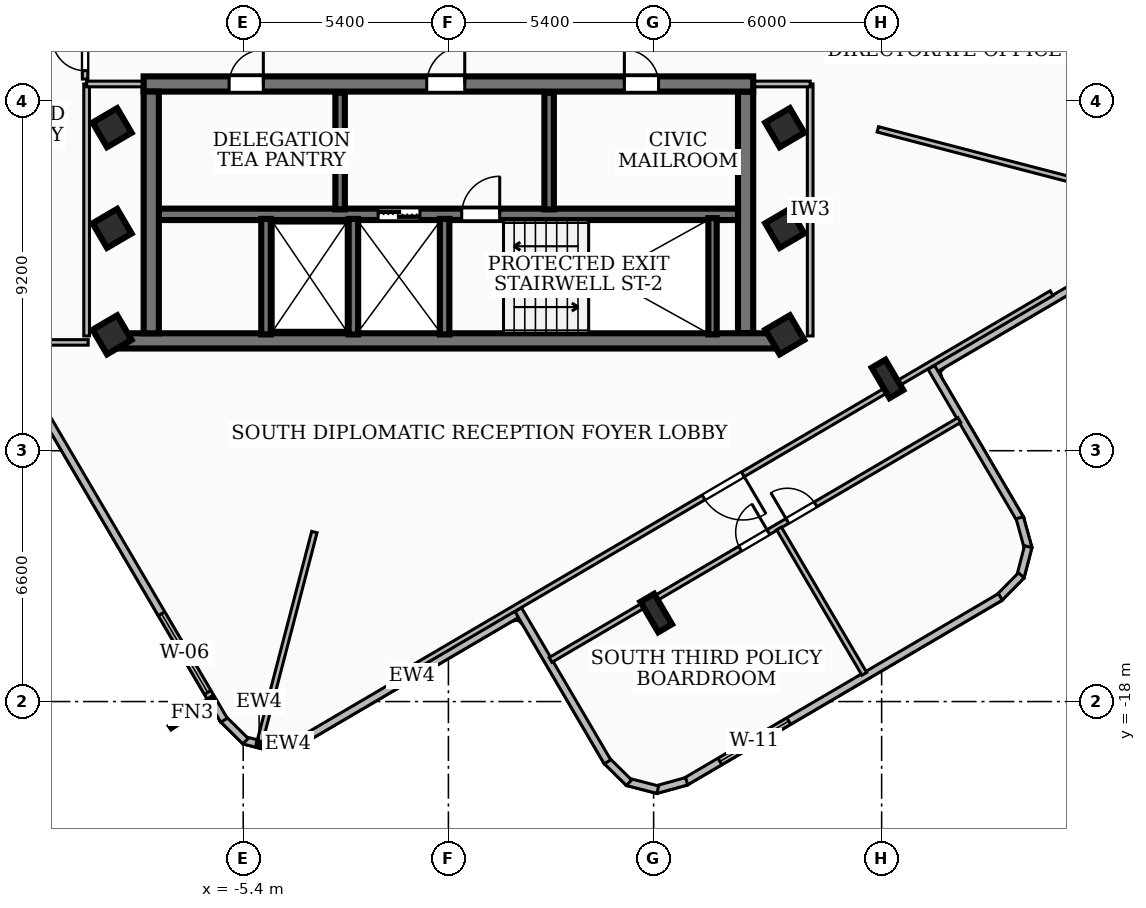
"""IFC4 building model, lengths in metres.
Left out: names, types, materials, properties, quantities, classifications, styles, units other than length and angle.
Written with IfcOpenShell. Run it as: python <this file> out.ifc"""

import sys

from ifc_helpers import new_model, si_unit, direction, frame, frame_2d, origin, origin_2d, place, context, subcontext, project, spatial, rectangle, i_section, extrude, element, fill, save


model = new_model("IFC4")
c1 = context("Model", 3, precision=1e-05, world=origin(), true_north=direction((0.0, 1.0)))
c2 = subcontext(c1, "Body", "Model", "MODEL_VIEW")
j1 = project(units=[si_unit("LENGTHUNIT", "METRE"), si_unit("PLANEANGLEUNIT", "RADIAN")], contexts=[c1])
p1 = place(None, origin())
s1 = spatial("IfcSite", under=j1, at=p1, CompositionType="ELEMENT")
p2 = place(p1, origin())
s2 = spatial("IfcBuilding", under=s1, at=p2, CompositionType="ELEMENT")
p3 = place(p2, frame((0.0, 0.0, 212.04)))
s3 = spatial("IfcBuildingStorey", under=s2, at=p3, CompositionType="ELEMENT", Elevation=212.04)
p4 = place(p3, frame((8.78, -8.51, 0.0), z_axis=(0.0, 0.0, 1.0), x_axis=(-1.0, 0.0, 0.0)))
e1 = element("IfcWall", 1, at=p4, inside=s3, PredefinedType="SHEAR", context=c2, shape_type="SweptSolid", body=[
    extrude(rectangle(XDim=17.56, YDim=0.4, at=frame_2d((8.78, 0.0))), origin(), (0.0, 0.0, 1.0), 3.16),
])
p5 = place(p3, frame((-8.02, -1.75, 0.0), z_axis=(0.0, 0.0, 1.0), x_axis=(1.0, 0.0, 0.0)))
e2 = element("IfcWall", 2, at=p5, inside=s3, PredefinedType="SHEAR", context=c2, shape_type="SweptSolid", body=[
    extrude(rectangle(XDim=16.04, YDim=0.4, at=frame_2d((8.02, 0.0))), origin(), (0.0, 0.0, 1.0), 3.16),
])
p6 = place(p5, frame((7.45, 0.0, 0.0)))
e3 = element("IfcOpeningElement", 3, at=p6, cuts=e2, PredefinedType="OPENING", context=c2, shape_type="SweptSolid", body=[
    extrude(rectangle(XDim=1.0, YDim=2.1, at=frame_2d((0.5, 1.05))), frame((0.0, 0.21, 0.0), z_axis=(0.0, -1.0, 0.0), x_axis=(1.0, 0.0, 0.0)), (0.0, 0.0, 1.0), 0.42),
])
p7 = place(p5, frame((12.65, 0.0, 0.0)))
e4 = element("IfcOpeningElement", 4, at=p7, cuts=e2, PredefinedType="OPENING", context=c2, shape_type="SweptSolid", body=[
    extrude(rectangle(XDim=0.9, YDim=2.06, at=frame_2d((0.45, 1.03))), frame((0.0, 0.21, 0.0), z_axis=(0.0, -1.0, 0.0), x_axis=(1.0, 0.0, 0.0)), (0.0, 0.0, 1.0), 0.42),
])
p8 = place(p5, frame((2.25, 0.0, 0.0)))
e5 = element("IfcOpeningElement", 5, at=p8, cuts=e2, PredefinedType="OPENING", context=c2, shape_type="SweptSolid", body=[
    extrude(rectangle(XDim=0.9, YDim=2.06, at=frame_2d((0.45, 1.03))), frame((0.0, 0.21, 0.0), z_axis=(0.0, -1.0, 0.0), x_axis=(1.0, 0.0, 0.0)), (0.0, 0.0, 1.0), 0.42),
])
for number, where, z_axis, x_axis in (
    (6, (-7.82, -8.31, 0.0), (0.0, 0.0, 1.0), (0.0, 1.0, 0.0)),
    (7, (7.82, -1.95, 0.0), (0.0, 0.0, 1.0), (0.0, -1.0, 0.0)),
):
    element("IfcWall", number, at=place(p3, frame(where, z_axis=z_axis, x_axis=x_axis)), inside=s3, PredefinedType="SHEAR", context=c2, shape_type="SweptSolid", body=[
        extrude(rectangle(XDim=6.36, YDim=0.4, at=frame_2d((3.18, 0.0))), origin(), (0.0, 0.0, 1.0), 3.16),
    ])
p9 = place(p3, frame((-7.62, -5.18, 0.0), z_axis=(0.0, 0.0, 1.0), x_axis=(1.0, 0.0, 0.0)))
e8 = element("IfcWall", 8, at=p9, inside=s3, PredefinedType="SOLIDWALL", context=c2, shape_type="SweptSolid", body=[
    extrude(rectangle(XDim=15.24, YDim=0.3, at=frame_2d((7.62, 0.0))), origin(), (0.0, 0.0, 1.0), 3.16),
])
p10 = place(p9, frame((5.77, 0.0, 0.0)))
e9 = element("IfcOpeningElement", 9, at=p10, cuts=e8, PredefinedType="OPENING", context=c2, shape_type="SweptSolid", body=[
    extrude(rectangle(XDim=1.1, YDim=2.15, at=frame_2d((0.55, 1.075))), frame((0.0, 0.16, 0.0), z_axis=(0.0, -1.0, 0.0), x_axis=(1.0, 0.0, 0.0)), (0.0, 0.0, 1.0), 0.32),
])
p11 = place(p9, frame((7.97, 0.0, 0.0)))
e10 = element("IfcOpeningElement", 10, at=p11, cuts=e8, PredefinedType="OPENING", context=c2, shape_type="SweptSolid", body=[
    extrude(rectangle(XDim=1.0, YDim=2.1, at=frame_2d((0.5, 1.05))), frame((0.0, 0.16, 0.0), z_axis=(0.0, -1.0, 0.0), x_axis=(1.0, 0.0, 0.0)), (0.0, 0.0, 1.0), 0.32),
])
p12 = place(p3, frame((6.95, -8.34, 0.0), z_axis=(0.0, 0.0, 1.0), x_axis=(0.0, 1.0, 0.0)))
e11 = element("IfcWall", 11, at=p12, inside=s3, PredefinedType="SOLIDWALL", context=c2, shape_type="SweptSolid", body=[
    extrude(rectangle(XDim=3.06, YDim=0.22, at=frame_2d((1.53, 0.0))), origin(), (0.0, 0.0, 1.0), 3.16),
])
for number, where, z_axis, x_axis in (
    (12, (-0.1, -8.34, 0.0), (0.0, 0.0, 1.0), (0.0, 1.0, 0.0)),
    (13, (-2.5, -8.34, 0.0), (0.0, 0.0, 1.0), (0.0, 1.0, 0.0)),
    (14, (-4.8, -8.34, 0.0), (0.0, 0.0, 1.0), (0.0, 1.0, 0.0)),
):
    element("IfcWall", number, at=place(p3, frame(where, z_axis=z_axis, x_axis=x_axis)), inside=s3, PredefinedType="SOLIDWALL", context=c2, shape_type="SweptSolid", body=[
        extrude(rectangle(XDim=3.04, YDim=0.25, at=frame_2d((1.52, 0.0))), origin(), (0.0, 0.0, 1.0), 3.16),
    ])
for number, where, z_axis, x_axis in (
    (15, (-2.85, -5.05, 0.0), (0.0, 0.0, 1.0), (0.0, 1.0, 0.0)),
    (16, (2.65, -5.05, 0.0), (0.0, 0.0, 1.0), (0.0, 1.0, 0.0)),
):
    element("IfcWall", number, at=place(p3, frame(where, z_axis=z_axis, x_axis=x_axis)), inside=s3, PredefinedType="SOLIDWALL", context=c2, shape_type="SweptSolid", body=[
        extrude(rectangle(XDim=3.07, YDim=0.25, at=frame_2d((1.535, 0.0))), origin(), (0.0, 0.0, 1.0), 3.16),
    ])
for number, where, z_axis, x_axis in (
    (17, (-8.85, -5.55, 0.0), (0.0, 0.0, 1.0), (0.863, 0.506, 0.0)),
    (18, (-8.85, -2.9, 0.0), (0.0, 0.0, 1.0), (0.863, 0.506, 0.0)),
    (19, (8.85, -5.55, 0.0), (0.0, 0.0, 1.0), (0.863, 0.506, 0.0)),
    (20, (8.85, -2.9, 0.0), (0.0, 0.0, 1.0), (0.863, 0.506, 0.0)),
    (21, (8.85, -8.35, 0.0), (0.0, 0.0, 1.0), (0.863, 0.506, 0.0)),
    (22, (-8.85, -8.35, 0.0), (0.0, 0.0, 1.0), (0.863, 0.506, 0.0)),
):
    element("IfcColumn", number, at=place(p3, frame(where, z_axis=z_axis, x_axis=x_axis)), inside=s3, PredefinedType="COLUMN", context=c2, shape_type="SweptSolid", body=[
        extrude(rectangle(XDim=0.75, YDim=0.75, at=origin_2d()), origin(), (0.0, 0.0, 1.0), 3.42),
    ])
for number, where, z_axis, x_axis in (
    (23, (5.468, -15.671, 0.0), (0.0, 0.0, 1.0), (0.863, 0.506, 0.0)),
    (24, (11.554, -9.51, 0.0), (0.0, 0.0, 1.0), (0.863, 0.506, 0.0)),
):
    element("IfcColumn", number, at=place(p3, frame(where, z_axis=z_axis, x_axis=x_axis)), inside=s3, PredefinedType="COLUMN", context=c2, shape_type="SweptSolid", body=[
        extrude(i_section(OverallWidth=0.418, OverallDepth=0.927, WebThickness=0.019, FlangeThickness=0.032, at=origin_2d()), origin(), (0.0, 0.0, 1.0), 3.42),
    ])
p13 = place(p3, frame((1.948, -15.612, 0.0), z_axis=(0.0, 0.0, 1.0), x_axis=(-0.86259717351, -0.505891407569, 0.0)))
e25 = element("IfcWall", 25, at=p13, inside=s3, PredefinedType="SOLIDWALL", context=c2, shape_type="SweptSolid", body=[
    extrude(rectangle(XDim=6.742, YDim=0.2, at=frame_2d((3.371, 0.0))), origin(), (0.0, 0.0, 1.0), 3.16),
])
p14 = place(p3, frame((-3.822, -19.003, 0.0), z_axis=(0.0, 0.0, 1.0), x_axis=(-0.963905015631, -0.266246353668, 0.0)))
e26 = element("IfcWall", 26, at=p14, inside=s3, PredefinedType="SOLIDWALL", context=c2, shape_type="SweptSolid", body=[
    extrude(rectangle(XDim=0.838, YDim=0.2, at=frame_2d((0.419, 0.0))), origin(), (0.0, 0.0, 1.0), 3.16),
])
p15 = place(p3, frame((-4.582, -19.225, 0.0), z_axis=(0.0, 0.0, 1.0), x_axis=(-0.967943577658, 0.251167733737, 0.0)))
e27 = element("IfcWall", 27, at=p15, inside=s3, PredefinedType="SOLIDWALL", context=c2, shape_type="SweptSolid", body=[
    extrude(rectangle(XDim=0.824, YDim=0.2, at=frame_2d((0.412, 0.0))), origin(), (0.0, 0.0, 1.0), 3.16),
])
p16 = place(p3, frame((-5.338, -19.042, 0.0), z_axis=(0.0, 0.0, 1.0), x_axis=(-0.711310891957, 0.702877524881, 0.0)))
e28 = element("IfcWall", 28, at=p16, inside=s3, PredefinedType="SOLIDWALL", context=c2, shape_type="SweptSolid", body=[
    extrude(rectangle(XDim=0.84, YDim=0.2, at=frame_2d((0.42, 0.0))), origin(), (0.0, 0.0, 1.0), 3.16),
])
p17 = place(p3, frame((-5.904, -18.492, 0.0), z_axis=(0.0, 0.0, 1.0), x_axis=(-0.506046465446, 0.862506217258, 0.0)))
e29 = element("IfcWall", 29, at=p17, inside=s3, PredefinedType="SOLIDWALL", context=c2, shape_type="SweptSolid", body=[
    extrude(rectangle(XDim=25.924, YDim=0.2, at=frame_2d((12.962, 0.0))), origin(), (0.0, 0.0, 1.0), 3.16),
])
p18 = place(p17, frame((0.85, 0.0, 0.85)))
e30 = element("IfcOpeningElement", 30, at=p18, cuts=e29, PredefinedType="OPENING", context=c2, shape_type="SweptSolid", body=[
    extrude(rectangle(XDim=2.4, YDim=1.85, at=frame_2d((1.2, 0.925))), frame((0.0, 0.11, 0.0), z_axis=(0.0, -1.0, 0.0), x_axis=(1.0, 0.0, 0.0)), (0.0, 0.0, 1.0), 0.22),
])
p19 = place(p3, frame((15.611, 1.948, 0.0), z_axis=(0.0, 0.0, 1.0), x_axis=(0.505999167705, -0.862533965872, 0.0)))
e31 = element("IfcWall", 31, at=p19, inside=s3, PredefinedType="SOLIDWALL", context=c2, shape_type="SweptSolid", body=[
    extrude(rectangle(XDim=6.743, YDim=0.2, at=frame_2d((3.372, 0.0))), origin(), (0.0, 0.0, 1.0), 3.16),
])
p20 = place(p3, frame((18.492, -5.904, 0.0), z_axis=(0.0, 0.0, 1.0), x_axis=(-0.86245977502, -0.506125613333, 0.0)))
e32 = element("IfcWall", 32, at=p20, inside=s3, PredefinedType="SOLIDWALL", context=c2, shape_type="SweptSolid", body=[
    extrude(rectangle(XDim=6.741, YDim=0.2, at=frame_2d((3.371, 0.0))), origin(), (0.0, 0.0, 1.0), 3.16),
])
p21 = place(p3, frame((12.707, -9.207, 0.0), z_axis=(0.0, 0.0, 1.0), x_axis=(0.505936854923, -0.862570518178, 0.0)))
e33 = element("IfcWall", 33, at=p21, inside=s3, PredefinedType="SOLIDWALL", context=c2, shape_type="SweptSolid", body=[
    extrude(rectangle(XDim=4.641, YDim=0.2, at=frame_2d((2.32, 0.0))), origin(), (0.0, 0.0, 1.0), 3.16),
])
p22 = place(p3, frame((15.035, -13.164, 0.0), z_axis=(0.0, 0.0, 1.0), x_axis=(0.266246353668, -0.963905015631, 0.0)))
e34 = element("IfcWall", 34, at=p22, inside=s3, PredefinedType="SOLIDWALL", context=c2, shape_type="SweptSolid", body=[
    extrude(rectangle(XDim=0.838, YDim=0.2, at=frame_2d((0.419, 0.0))), origin(), (0.0, 0.0, 1.0), 3.16),
])
p23 = place(p3, frame((15.257, -13.924, 0.0), z_axis=(0.0, 0.0, 1.0), x_axis=(-0.251167733737, -0.967943577658, 0.0)))
e35 = element("IfcWall", 35, at=p23, inside=s3, PredefinedType="SOLIDWALL", context=c2, shape_type="SweptSolid", body=[
    extrude(rectangle(XDim=0.824, YDim=0.2, at=frame_2d((0.412, 0.0))), origin(), (0.0, 0.0, 1.0), 3.16),
])
p24 = place(p3, frame((15.074, -14.68, 0.0), z_axis=(0.0, 0.0, 1.0), x_axis=(-0.702877524881, -0.711310891957, 0.0)))
e36 = element("IfcWall", 36, at=p24, inside=s3, PredefinedType="SOLIDWALL", context=c2, shape_type="SweptSolid", body=[
    extrude(rectangle(XDim=0.84, YDim=0.2, at=frame_2d((0.42, 0.0))), origin(), (0.0, 0.0, 1.0), 3.16),
])
p25 = place(p3, frame((14.524, -15.246, 0.0), z_axis=(0.0, 0.0, 1.0), x_axis=(-0.862483422861, -0.506085314241, 0.0)))
e37 = element("IfcWall", 37, at=p25, inside=s3, PredefinedType="SOLIDWALL", context=c2, shape_type="SweptSolid", body=[
    extrude(rectangle(XDim=9.625, YDim=0.2, at=frame_2d((4.812, 0.0))), origin(), (0.0, 0.0, 1.0), 3.16),
])
p26 = place(p25, frame((6.457, 0.0, 0.85)))
e38 = element("IfcOpeningElement", 38, at=p26, cuts=e37, PredefinedType="OPENING", context=c2, shape_type="SweptSolid", body=[
    extrude(rectangle(XDim=2.1, YDim=1.6, at=frame_2d((1.05, 0.8))), frame((0.0, 0.11, 0.0), z_axis=(0.0, -1.0, 0.0), x_axis=(1.0, 0.0, 0.0)), (0.0, 0.0, 1.0), 0.22),
])
p27 = place(p3, frame((6.269, -20.097, 0.0), z_axis=(0.0, 0.0, 1.0), x_axis=(-0.963925656212, -0.266171616247, 0.0)))
e39 = element("IfcWall", 39, at=p27, inside=s3, PredefinedType="SOLIDWALL", context=c2, shape_type="SweptSolid", body=[
    extrude(rectangle(XDim=0.838, YDim=0.2, at=frame_2d((0.419, 0.0))), origin(), (0.0, 0.0, 1.0), 3.16),
])
p28 = place(p3, frame((5.509, -20.319, 0.0), z_axis=(0.0, 0.0, 1.0), x_axis=(-0.967962254737, 0.251095745493, 0.0)))
e40 = element("IfcWall", 40, at=p28, inside=s3, PredefinedType="SOLIDWALL", context=c2, shape_type="SweptSolid", body=[
    extrude(rectangle(XDim=0.824, YDim=0.2, at=frame_2d((0.412, 0.0))), origin(), (0.0, 0.0, 1.0), 3.16),
])
p29 = place(p3, frame((4.753, -20.136, 0.0), z_axis=(0.0, 0.0, 1.0), x_axis=(-0.711167178618, 0.70302293281, 0.0)))
e41 = element("IfcWall", 41, at=p29, inside=s3, PredefinedType="SOLIDWALL", context=c2, shape_type="SweptSolid", body=[
    extrude(rectangle(XDim=0.839, YDim=0.2, at=frame_2d((0.42, 0.0))), origin(), (0.0, 0.0, 1.0), 3.16),
])
p30 = place(p3, frame((4.187, -19.586, 0.0), z_axis=(0.0, 0.0, 1.0), x_axis=(-0.505936854923, 0.862570518178, 0.0)))
e42 = element("IfcWall", 42, at=p30, inside=s3, PredefinedType="SOLIDWALL", context=c2, shape_type="SweptSolid", body=[
    extrude(rectangle(XDim=4.641, YDim=0.2, at=frame_2d((2.32, 0.0))), origin(), (0.0, 0.0, 1.0), 3.16),
])
p31 = place(p3, frame((-9.52, -8.38, 0.0), z_axis=(0.0, 0.0, 1.0), x_axis=(0.0, 1.0, 0.0)))
e43 = element("IfcWall", 43, at=p31, inside=s3, PredefinedType="PARTITIONING", context=c2, shape_type="SweptSolid", body=[
    extrude(rectangle(XDim=6.63, YDim=0.15, at=frame_2d((3.315, 0.0))), origin(), (0.0, 0.0, 1.0), 3.16),
])
p32 = place(p3, frame((-7.85, -1.75, 0.0), z_axis=(0.0, 0.0, 1.0), x_axis=(-1.0, 0.0, 0.0)))
e44 = element("IfcWall", 44, at=p32, inside=s3, PredefinedType="PARTITIONING", context=c2, shape_type="SweptSolid", body=[
    extrude(rectangle(XDim=1.67, YDim=0.15, at=frame_2d((0.835, 0.0))), origin(), (0.0, 0.0, 1.0), 2.39),
])
p33 = place(p3, frame((9.52, -8.38, 0.0), z_axis=(0.0, 0.0, 1.0), x_axis=(0.0, 1.0, 0.0)))
e45 = element("IfcWall", 45, at=p33, inside=s3, PredefinedType="PARTITIONING", context=c2, shape_type="SweptSolid", body=[
    extrude(rectangle(XDim=6.63, YDim=0.15, at=frame_2d((3.315, 0.0))), origin(), (0.0, 0.0, 1.0), 3.16),
])
p34 = place(p3, frame((7.85, -1.75, 0.0), z_axis=(0.0, 0.0, 1.0), x_axis=(1.0, 0.0, 0.0)))
e46 = element("IfcWall", 46, at=p34, inside=s3, PredefinedType="PARTITIONING", context=c2, shape_type="SweptSolid", body=[
    extrude(rectangle(XDim=1.67, YDim=0.15, at=frame_2d((0.835, 0.0))), origin(), (0.0, 0.0, 1.0), 2.39),
])
p35 = place(p3, frame((-11.662, -8.55, 0.0), z_axis=(0.0, 0.0, 1.0), x_axis=(1.0, 0.0, 0.0)))
e47 = element("IfcWall", 47, at=p35, inside=s3, PredefinedType="PARTITIONING", context=c2, shape_type="SweptSolid", body=[
    extrude(rectangle(XDim=2.182, YDim=0.145, at=frame_2d((1.091, 0.0))), origin(), (0.0, 0.0, 1.0), 3.16),
])
p36 = place(p3, frame((-9.56, -1.62, 0.0), z_axis=(0.0, 0.0, 1.0), x_axis=(0.0, 1.0, 0.0)))
e48 = element("IfcWall", 48, at=p36, inside=s3, PredefinedType="PARTITIONING", context=c2, shape_type="SweptSolid", body=[
    extrude(rectangle(XDim=3.24, YDim=0.145, at=frame_2d((1.62, 0.0))), origin(), (0.0, 0.0, 1.0), 3.16),
])
p37 = place(p36, frame((0.22, 0.0, 0.0)))
e49 = element("IfcOpeningElement", 49, at=p37, cuts=e48, PredefinedType="OPENING", context=c2, shape_type="SweptSolid", body=[
    extrude(rectangle(XDim=0.86, YDim=2.04, at=frame_2d((0.43, 1.02))), frame((0.0, 0.083, 0.0), z_axis=(0.0, -1.0, 0.0), x_axis=(1.0, 0.0, 0.0)), (0.0, 0.0, 1.0), 0.165),
])
p38 = place(p36, frame((2.16, 0.0, 0.0)))
e50 = element("IfcOpeningElement", 50, at=p38, cuts=e48, PredefinedType="OPENING", context=c2, shape_type="SweptSolid", body=[
    extrude(rectangle(XDim=0.86, YDim=2.04, at=frame_2d((0.43, 1.02))), frame((0.0, 0.083, 0.0), z_axis=(0.0, -1.0, 0.0), x_axis=(1.0, 0.0, 0.0)), (0.0, 0.0, 1.0), 0.165),
])
p39 = place(p3, frame((-3.527, -13.54, 0.0), z_axis=(0.0, 0.0, 1.0), x_axis=(-0.252132617321, -0.967692690519, 0.0)))
e51 = element("IfcWall", 51, at=p39, inside=s3, PredefinedType="PARTITIONING", context=c2, shape_type="SweptSolid", body=[
    extrude(rectangle(XDim=5.703, YDim=0.145, at=frame_2d((2.852, 0.0))), origin(), (0.0, 0.0, 1.0), 3.16),
])
p40 = place(p3, frame((11.3, -2.944, 0.0), z_axis=(0.0, 0.0, 1.0), x_axis=(0.967711624716, -0.252059936106, 0.0)))
e52 = element("IfcWall", 52, at=p40, inside=s3, PredefinedType="PARTITIONING", context=c2, shape_type="SweptSolid", body=[
    extrude(rectangle(XDim=8.018, YDim=0.145, at=frame_2d((4.009, 0.0))), origin(), (0.0, 0.0, 1.0), 3.16),
])
p41 = place(p3, frame((15.873, -7.255, 0.0), z_axis=(0.0, 0.0, 1.0), x_axis=(-0.862498672631, -0.506059324299, 0.0)))
e53 = element("IfcWall", 53, at=p41, inside=s3, PredefinedType="PARTITIONING", context=c2, shape_type="SweptSolid", body=[
    extrude(rectangle(XDim=20.039, YDim=0.145, at=frame_2d((10.02, 0.0))), origin(), (0.0, 0.0, 1.0), 2.53),
])
p42 = place(p41, frame((9.42, 0.0, 0.0)))
e54 = element("IfcOpeningElement", 54, at=p42, cuts=e53, PredefinedType="OPENING", context=c2, shape_type="SweptSolid", body=[
    extrude(rectangle(XDim=1.2, YDim=2.1, at=frame_2d((0.6, 1.05))), frame((0.0, 0.083, 0.0), z_axis=(0.0, -1.0, 0.0), x_axis=(1.0, 0.0, 0.0)), (0.0, 0.0, 1.0), 0.165),
])
p43 = place(p3, frame((8.7, -13.446, 0.0), z_axis=(0.0, 0.0, 1.0), x_axis=(0.506043007476, -0.862508246097, 0.0)))
e55 = element("IfcWall", 55, at=p43, inside=s3, PredefinedType="PARTITIONING", context=c2, shape_type="SweptSolid", body=[
    extrude(rectangle(XDim=4.435, YDim=0.145, at=frame_2d((2.217, 0.0))), origin(), (0.0, 0.0, 1.0), 3.16),
])
p44 = place(p3, frame((2.688, -16.904, 0.0), z_axis=(0.0, 0.0, 1.0), x_axis=(0.862497334811, 0.506061604396, 0.0)))
e56 = element("IfcWall", 56, at=p44, inside=s3, PredefinedType="PARTITIONING", context=c2, shape_type="SweptSolid", body=[
    extrude(rectangle(XDim=12.471, YDim=0.145, at=frame_2d((6.235, 0.0))), origin(), (0.0, 0.0, 1.0), 2.53),
])
p45 = place(p44, frame((5.785, 0.0, 0.0)))
e57 = element("IfcOpeningElement", 57, at=p45, cuts=e56, PredefinedType="OPENING", context=c2, shape_type="SweptSolid", body=[
    extrude(rectangle(XDim=0.86, YDim=2.04, at=frame_2d((0.43, 1.02))), frame((0.0, 0.083, 0.0), z_axis=(0.0, -1.0, 0.0), x_axis=(1.0, 0.0, 0.0)), (0.0, 0.0, 1.0), 0.165),
])
p46 = place(p44, frame((7.225, 0.0, 0.0)))
e58 = element("IfcOpeningElement", 58, at=p46, cuts=e56, PredefinedType="OPENING", context=c2, shape_type="SweptSolid", body=[
    extrude(rectangle(XDim=0.86, YDim=2.04, at=frame_2d((0.43, 1.02))), frame((0.0, 0.083, 0.0), z_axis=(0.0, -1.0, 0.0), x_axis=(1.0, 0.0, 0.0)), (0.0, 0.0, 1.0), 0.165),
])
p47 = place(p18, origin())
e59 = element("IfcWindow", 59, at=p47, inside=s3, PartitioningType="SINGLE_PANEL", PredefinedType="WINDOW", context=c2, shape_type="SweptSolid", body=[
    extrude(rectangle(XDim=2.4, YDim=1.85, at=frame_2d((1.2, 0.925))), frame((0.0, 0.03, 0.0), z_axis=(0.0, -1.0, 0.0), x_axis=(1.0, 0.0, 0.0)), (0.0, 0.0, 1.0), 0.06),
])
fill(e30, e59)
p48 = place(p26, origin())
e60 = element("IfcWindow", 60, at=p48, inside=s3, PartitioningType="SINGLE_PANEL", PredefinedType="WINDOW", context=c2, shape_type="SweptSolid", body=[
    extrude(rectangle(XDim=2.1, YDim=1.6, at=frame_2d((1.05, 0.8))), frame((0.0, 0.03, 0.0), z_axis=(0.0, -1.0, 0.0), x_axis=(1.0, 0.0, 0.0)), (0.0, 0.0, 1.0), 0.06),
])
fill(e38, e60)
p49 = place(p6, origin())
e61 = element("IfcDoor", 61, at=p49, inside=s3, OperationType="SINGLE_SWING_RIGHT", PredefinedType="DOOR", context=c2, shape_type="SweptSolid", body=[
    extrude(rectangle(XDim=1.0, YDim=2.1, at=frame_2d((0.5, 1.05))), frame((0.0, 0.025, 0.0), z_axis=(0.0, -1.0, 0.0), x_axis=(1.0, 0.0, 0.0)), (0.0, 0.0, 1.0), 0.05),
])
fill(e3, e61)
p50 = place(p10, origin())
e62 = element("IfcDoor", 62, at=p50, inside=s3, OperationType="DOUBLE_DOOR_SLIDING", PredefinedType="DOOR", context=c2, shape_type="SweptSolid", body=[
    extrude(rectangle(XDim=1.1, YDim=2.15, at=frame_2d((0.55, 1.075))), frame((0.0, 0.025, 0.0), z_axis=(0.0, -1.0, 0.0), x_axis=(1.0, 0.0, 0.0)), (0.0, 0.0, 1.0), 0.05),
])
fill(e9, e62)
p51 = place(p11, origin())
e63 = element("IfcDoor", 63, at=p51, inside=s3, OperationType="SINGLE_SWING_RIGHT", PredefinedType="DOOR", context=c2, shape_type="SweptSolid", body=[
    extrude(rectangle(XDim=1.0, YDim=2.1, at=frame_2d((0.5, 1.05))), frame((0.0, 0.025, 0.0), z_axis=(0.0, -1.0, 0.0), x_axis=(1.0, 0.0, 0.0)), (0.0, 0.0, 1.0), 0.05),
])
fill(e10, e63)
p52 = place(p7, origin())
e64 = element("IfcDoor", 64, at=p52, inside=s3, OperationType="SINGLE_SWING_LEFT", PredefinedType="DOOR", context=c2, shape_type="SweptSolid", body=[
    extrude(rectangle(XDim=0.9, YDim=2.06, at=frame_2d((0.45, 1.03))), frame((0.0, 0.025, 0.0), z_axis=(0.0, -1.0, 0.0), x_axis=(1.0, 0.0, 0.0)), (0.0, 0.0, 1.0), 0.05),
])
fill(e4, e64)
p53 = place(p8, origin())
e65 = element("IfcDoor", 65, at=p53, inside=s3, OperationType="SINGLE_SWING_RIGHT", PredefinedType="DOOR", context=c2, shape_type="SweptSolid", body=[
    extrude(rectangle(XDim=0.9, YDim=2.06, at=frame_2d((0.45, 1.03))), frame((0.0, 0.025, 0.0), z_axis=(0.0, -1.0, 0.0), x_axis=(1.0, 0.0, 0.0)), (0.0, 0.0, 1.0), 0.05),
])
fill(e5, e65)
p54 = place(p37, origin())
e66 = element("IfcDoor", 66, at=p54, inside=s3, OperationType="SINGLE_SWING_RIGHT", PredefinedType="DOOR", context=c2, shape_type="SweptSolid", body=[
    extrude(rectangle(XDim=0.86, YDim=2.04, at=frame_2d((0.43, 1.02))), frame((0.0, 0.025, 0.0), z_axis=(0.0, -1.0, 0.0), x_axis=(1.0, 0.0, 0.0)), (0.0, 0.0, 1.0), 0.05),
])
fill(e49, e66)
p55 = place(p42, origin())
e67 = element("IfcDoor", 67, at=p55, inside=s3, OperationType="SINGLE_SWING_LEFT", PredefinedType="DOOR", context=c2, shape_type="SweptSolid", body=[
    extrude(rectangle(XDim=1.2, YDim=2.1, at=frame_2d((0.6, 1.05))), frame((0.0, 0.025, 0.0), z_axis=(0.0, -1.0, 0.0), x_axis=(1.0, 0.0, 0.0)), (0.0, 0.0, 1.0), 0.05),
])
fill(e54, e67)
p56 = place(p45, origin())
e68 = element("IfcDoor", 68, at=p56, inside=s3, OperationType="SINGLE_SWING_RIGHT", PredefinedType="DOOR", context=c2, shape_type="SweptSolid", body=[
    extrude(rectangle(XDim=0.86, YDim=2.04, at=frame_2d((0.43, 1.02))), frame((0.0, 0.025, 0.0), z_axis=(0.0, -1.0, 0.0), x_axis=(1.0, 0.0, 0.0)), (0.0, 0.0, 1.0), 0.05),
])
fill(e57, e68)
p57 = place(p46, origin())
e69 = element("IfcDoor", 69, at=p57, inside=s3, OperationType="SINGLE_SWING_LEFT", PredefinedType="DOOR", context=c2, shape_type="SweptSolid", body=[
    extrude(rectangle(XDim=0.86, YDim=2.04, at=frame_2d((0.43, 1.02))), frame((0.0, 0.025, 0.0), z_axis=(0.0, -1.0, 0.0), x_axis=(1.0, 0.0, 0.0)), (0.0, 0.0, 1.0), 0.05),
])
fill(e58, e69)
save(model, sys.argv[1])
